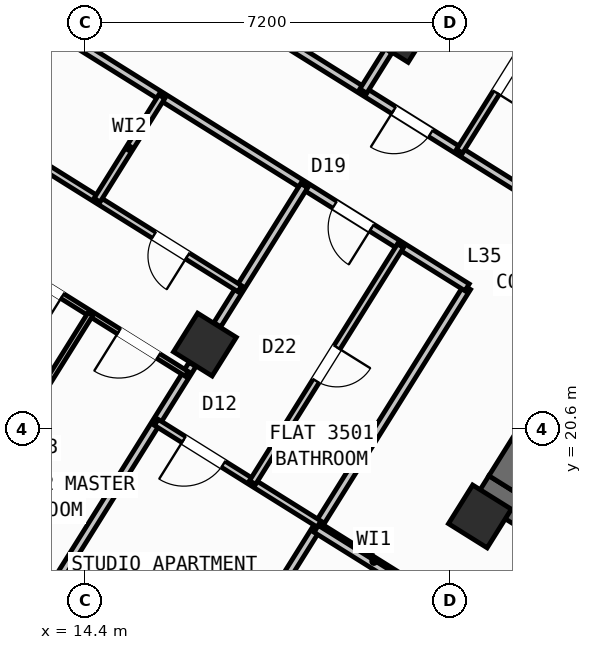
"""IFC4 building model, lengths in metres.
Left out: names, types, materials, properties, quantities, classifications, styles, units other than length and angle.
Written with IfcOpenShell. Run it as: python <this file> out.ifc"""

import sys

from ifc_helpers import new_model, si_unit, direction, frame, frame_2d, origin, origin_2d, place, context, subcontext, project, spatial, rectangle, hollow_rectangle, extrude, source, transform, mapped, element, fill, save


model = new_model("IFC4")
c1 = context("Model", 3, precision=1e-05, world=origin(), true_north=direction((0.0, 1.0)))
c2 = subcontext(c1, "Body", "Model", "MODEL_VIEW")
j1 = project(units=[si_unit("LENGTHUNIT", "METRE"), si_unit("PLANEANGLEUNIT", "RADIAN")], contexts=[c1])
p1 = place(None, origin())
s1 = spatial("IfcSite", under=j1, at=p1, CompositionType="ELEMENT")
p2 = place(p1, origin())
s2 = spatial("IfcBuilding", under=s1, at=p2, CompositionType="ELEMENT")
p3 = place(p2, frame((0.0, 0.0, 140.7)))
s3 = spatial("IfcBuildingStorey", under=s2, at=p3, CompositionType="ELEMENT", Elevation=140.7)
p4 = place(p3, frame((33.366, 12.477, 0.0), z_axis=(0.0, 0.0, 1.0), x_axis=(-0.848047359947, 0.529920442413, 0.0)))
e1 = element("IfcWall", 1, at=p4, inside=s3, PredefinedType="SHEAR", context=c2, shape_type="SweptSolid", body=[
    extrude(rectangle(XDim=13.14, YDim=0.55, at=frame_2d((6.57, 0.0))), origin(), (0.0, 0.0, 1.0), 3.35),
])
p5 = place(p3, frame((26.007, 24.976, 0.0), z_axis=(0.0, 0.0, 1.0), x_axis=(-0.529923795287, -0.848045264823, 0.0)))
e2 = element("IfcWall", 2, at=p5, inside=s3, PredefinedType="SHEAR", context=c2, shape_type="SweptSolid", body=[
    extrude(rectangle(XDim=6.425, YDim=0.55, at=frame_2d((3.212, 0.0))), origin(), (0.0, 0.0, 1.0), 3.35),
])
m1 = source(origin(), c2, "Body", "SweptSolid", [
    extrude(hollow_rectangle(XDim=0.9, YDim=0.9, WallThickness=0.036, at=origin_2d()), origin(), (0.0, 0.0, 1.0), 3.6),
])
for number, where, z_axis, x_axis in (
    (3, (22.191, 18.87, 0.0), (0.0, 0.0, 1.0), (-0.848, 0.53, 0.0)),
    (4, (20.632, 28.452, 0.0), (0.0, 0.0, 1.0), (-0.848, 0.53, 0.0)),
    (5, (16.764, 22.261, 0.0), (0.0, 0.0, 1.0), (-0.848, 0.53, 0.0)),
):
    element("IfcColumn", number, at=place(p3, frame(where, z_axis=z_axis, x_axis=x_axis)), inside=s3, PredefinedType="COLUMN", context=c2, shape_type="MappedRepresentation", body=[
        mapped(m1, transform((0.0, 0.0, 0.0), scale=1.0)),
    ])
p6 = place(p3, frame((29.268, 6.429, 0.0), z_axis=(0.0, 0.0, 1.0), x_axis=(-0.848049971435, 0.529916263149, 0.0)))
e6 = element("IfcWall", 6, at=p6, inside=s3, PredefinedType="STANDARD", context=c2, shape_type="SweptSolid", body=[
    extrude(rectangle(XDim=31.588, YDim=0.32, at=frame_2d((15.794, 0.0))), origin(), (0.0, 0.0, 1.0), 3.35),
])
p7 = place(p6, frame((16.362, 0.0, 0.0)))
e7 = element("IfcOpeningElement", 7, at=p7, cuts=e6, PredefinedType="OPENING", context=c2, shape_type="SweptSolid", body=[
    extrude(rectangle(XDim=1.2, YDim=2.15, at=frame_2d((0.6, 1.075))), frame((0.0, 0.17, 0.0), z_axis=(0.0, -1.0, 0.0), x_axis=(1.0, 0.0, 0.0)), (0.0, 0.0, 1.0), 0.34),
])
p8 = place(p6, frame((2.989, 0.0, 0.8)))
e8 = element("IfcOpeningElement", 8, at=p8, cuts=e6, PredefinedType="OPENING", context=c2, shape_type="SweptSolid", body=[
    extrude(rectangle(XDim=2.1, YDim=1.55, at=frame_2d((1.05, 0.775))), frame((0.0, 0.17, 0.0), z_axis=(0.0, -1.0, 0.0), x_axis=(1.0, 0.0, 0.0)), (0.0, 0.0, 1.0), 0.34),
])
p9 = place(p6, frame((8.359, 0.0, 0.8)))
e9 = element("IfcOpeningElement", 9, at=p9, cuts=e6, PredefinedType="OPENING", context=c2, shape_type="SweptSolid", body=[
    extrude(rectangle(XDim=2.1, YDim=1.55, at=frame_2d((1.05, 0.775))), frame((0.0, 0.17, 0.0), z_axis=(0.0, -1.0, 0.0), x_axis=(1.0, 0.0, 0.0)), (0.0, 0.0, 1.0), 0.34),
])
p10 = place(p6, frame((13.284, 0.0, 0.95)))
e10 = element("IfcOpeningElement", 10, at=p10, cuts=e6, PredefinedType="OPENING", context=c2, shape_type="SweptSolid", body=[
    extrude(rectangle(XDim=1.2, YDim=1.4, at=frame_2d((0.6, 0.7))), frame((0.0, 0.17, 0.0), z_axis=(0.0, -1.0, 0.0), x_axis=(1.0, 0.0, 0.0)), (0.0, 0.0, 1.0), 0.34),
])
p11 = place(p6, frame((29.188, 0.0, 0.95)))
e11 = element("IfcOpeningElement", 11, at=p11, cuts=e6, PredefinedType="OPENING", context=c2, shape_type="SweptSolid", body=[
    extrude(rectangle(XDim=1.2, YDim=1.4, at=frame_2d((0.6, 0.7))), frame((0.0, 0.17, 0.0), z_axis=(0.0, -1.0, 0.0), x_axis=(1.0, 0.0, 0.0)), (0.0, 0.0, 1.0), 0.34),
])
p12 = place(p6, frame((19.674, 0.0, 1.0)))
e12 = element("IfcOpeningElement", 12, at=p12, cuts=e6, PredefinedType="OPENING", context=c2, shape_type="SweptSolid", body=[
    extrude(rectangle(XDim=0.9, YDim=1.25, at=frame_2d((0.45, 0.625))), frame((0.0, 0.17, 0.0), z_axis=(0.0, -1.0, 0.0), x_axis=(1.0, 0.0, 0.0)), (0.0, 0.0, 1.0), 0.34),
])
p13 = place(p6, frame((21.896, 0.0, 1.0)))
e13 = element("IfcOpeningElement", 13, at=p13, cuts=e6, PredefinedType="OPENING", context=c2, shape_type="SweptSolid", body=[
    extrude(rectangle(XDim=0.9, YDim=1.25, at=frame_2d((0.45, 0.625))), frame((0.0, 0.17, 0.0), z_axis=(0.0, -1.0, 0.0), x_axis=(1.0, 0.0, 0.0)), (0.0, 0.0, 1.0), 0.34),
])
p14 = place(p6, frame((24.106, 0.0, 1.0)))
e14 = element("IfcOpeningElement", 14, at=p14, cuts=e6, PredefinedType="OPENING", context=c2, shape_type="SweptSolid", body=[
    extrude(rectangle(XDim=0.65, YDim=1.15, at=frame_2d((0.325, 0.575))), frame((0.0, 0.17, 0.0), z_axis=(0.0, -1.0, 0.0), x_axis=(1.0, 0.0, 0.0)), (0.0, 0.0, 1.0), 0.34),
])
p15 = place(p6, frame((26.366, 0.0, 1.0)))
e15 = element("IfcOpeningElement", 15, at=p15, cuts=e6, PredefinedType="OPENING", context=c2, shape_type="SweptSolid", body=[
    extrude(rectangle(XDim=0.9, YDim=1.25, at=frame_2d((0.45, 0.625))), frame((0.0, 0.17, 0.0), z_axis=(0.0, -1.0, 0.0), x_axis=(1.0, 0.0, 0.0)), (0.0, 0.0, 1.0), 0.34),
])
p16 = place(p3, frame((2.415, 23.452, 0.0), z_axis=(0.0, 0.0, 1.0), x_axis=(0.52991049553, 0.848053575387, 0.0)))
e16 = element("IfcWall", 16, at=p16, inside=s3, PredefinedType="STANDARD", context=c2, shape_type="SweptSolid", body=[
    extrude(rectangle(XDim=21.587, YDim=0.32, at=frame_2d((10.794, 0.0))), origin(), (0.0, 0.0, 1.0), 2.775),
])
p17 = place(p16, frame((2.356, 0.0, 0.8)))
e17 = element("IfcOpeningElement", 17, at=p17, cuts=e16, PredefinedType="OPENING", context=c2, shape_type="SweptSolid", body=[
    extrude(rectangle(XDim=2.1, YDim=1.55, at=frame_2d((1.05, 0.775))), frame((0.0, 0.17, 0.0), z_axis=(0.0, -1.0, 0.0), x_axis=(1.0, 0.0, 0.0)), (0.0, 0.0, 1.0), 0.34),
])
p18 = place(p16, frame((8.639, 0.0, 1.0)))
e18 = element("IfcOpeningElement", 18, at=p18, cuts=e16, PredefinedType="OPENING", context=c2, shape_type="SweptSolid", body=[
    extrude(rectangle(XDim=0.9, YDim=1.25, at=frame_2d((0.45, 0.625))), frame((0.0, 0.17, 0.0), z_axis=(0.0, -1.0, 0.0), x_axis=(1.0, 0.0, 0.0)), (0.0, 0.0, 1.0), 0.34),
])
p19 = place(p16, frame((17.744, 0.0, 0.85)))
e19 = element("IfcOpeningElement", 19, at=p19, cuts=e16, PredefinedType="OPENING", context=c2, shape_type="SweptSolid", body=[
    extrude(rectangle(XDim=1.5, YDim=1.5, at=frame_2d((0.75, 0.75))), frame((0.0, 0.17, 0.0), z_axis=(0.0, -1.0, 0.0), x_axis=(1.0, 0.0, 0.0)), (0.0, 0.0, 1.0), 0.34),
])
p20 = place(p3, frame((14.138, 41.825, 0.0), z_axis=(0.0, 0.0, 1.0), x_axis=(0.848046498049, -0.529921821731, 0.0)))
e20 = element("IfcWall", 20, at=p20, inside=s3, PredefinedType="STANDARD", context=c2, shape_type="SweptSolid", body=[
    extrude(rectangle(XDim=31.588, YDim=0.32, at=frame_2d((15.794, 0.0))), origin(), (0.0, 0.0, 1.0), 3.35),
])
p21 = place(p20, frame((2.949, 0.0, 0.0)))
e21 = element("IfcOpeningElement", 21, at=p21, cuts=e20, PredefinedType="OPENING", context=c2, shape_type="SweptSolid", body=[
    extrude(rectangle(XDim=1.05, YDim=2.15, at=frame_2d((0.525, 1.075))), frame((0.0, 0.17, 0.0), z_axis=(0.0, -1.0, 0.0), x_axis=(1.0, 0.0, 0.0)), (0.0, 0.0, 1.0), 0.34),
])
p22 = place(p20, frame((0.861, 0.0, 0.85)))
e22 = element("IfcOpeningElement", 22, at=p22, cuts=e20, PredefinedType="OPENING", context=c2, shape_type="SweptSolid", body=[
    extrude(rectangle(XDim=1.5, YDim=1.5, at=frame_2d((0.75, 0.75))), frame((0.0, 0.17, 0.0), z_axis=(0.0, -1.0, 0.0), x_axis=(1.0, 0.0, 0.0)), (0.0, 0.0, 1.0), 0.34),
])
p23 = place(p20, frame((8.494, 0.0, 0.85)))
e23 = element("IfcOpeningElement", 23, at=p23, cuts=e20, PredefinedType="OPENING", context=c2, shape_type="SweptSolid", body=[
    extrude(rectangle(XDim=1.8, YDim=1.5, at=frame_2d((0.9, 0.75))), frame((0.0, 0.17, 0.0), z_axis=(0.0, -1.0, 0.0), x_axis=(1.0, 0.0, 0.0)), (0.0, 0.0, 1.0), 0.34),
])
p24 = place(p20, frame((13.874, 0.0, 0.85)))
e24 = element("IfcOpeningElement", 24, at=p24, cuts=e20, PredefinedType="OPENING", context=c2, shape_type="SweptSolid", body=[
    extrude(rectangle(XDim=1.5, YDim=1.5, at=frame_2d((0.75, 0.75))), frame((0.0, 0.17, 0.0), z_axis=(0.0, -1.0, 0.0), x_axis=(1.0, 0.0, 0.0)), (0.0, 0.0, 1.0), 0.34),
])
p25 = place(p20, frame((17.104, 0.0, 1.0)))
e25 = element("IfcOpeningElement", 25, at=p25, cuts=e20, PredefinedType="OPENING", context=c2, shape_type="SweptSolid", body=[
    extrude(rectangle(XDim=0.9, YDim=1.25, at=frame_2d((0.45, 0.625))), frame((0.0, 0.17, 0.0), z_axis=(0.0, -1.0, 0.0), x_axis=(1.0, 0.0, 0.0)), (0.0, 0.0, 1.0), 0.34),
])
p26 = place(p20, frame((22.144, 0.0, 1.0)))
e26 = element("IfcOpeningElement", 26, at=p26, cuts=e20, PredefinedType="OPENING", context=c2, shape_type="SweptSolid", body=[
    extrude(rectangle(XDim=0.9, YDim=1.25, at=frame_2d((0.45, 0.625))), frame((0.0, 0.17, 0.0), z_axis=(0.0, -1.0, 0.0), x_axis=(1.0, 0.0, 0.0)), (0.0, 0.0, 1.0), 0.34),
])
p27 = place(p20, frame((27.744, 0.0, 1.0)))
e27 = element("IfcOpeningElement", 27, at=p27, cuts=e20, PredefinedType="OPENING", context=c2, shape_type="SweptSolid", body=[
    extrude(rectangle(XDim=0.9, YDim=1.25, at=frame_2d((0.45, 0.625))), frame((0.0, 0.17, 0.0), z_axis=(0.0, -1.0, 0.0), x_axis=(1.0, 0.0, 0.0)), (0.0, 0.0, 1.0), 0.34),
])
p28 = place(p3, frame((21.206, 17.292, 0.0), z_axis=(0.0, 0.0, 1.0), x_axis=(-0.848050851465, 0.529914854792, 0.0)))
e28 = element("IfcWall", 28, at=p28, inside=s3, PredefinedType="PARTITIONING", context=c2, shape_type="SweptSolid", body=[
    extrude(rectangle(XDim=2.61, YDim=0.16, at=frame_2d((1.305, 0.0))), origin(), (0.0, 0.0, 1.0), 3.34),
])
p29 = place(p3, frame((21.938, 23.391, 0.0), z_axis=(0.0, 0.0, 1.0), x_axis=(-0.529924725692, -0.848044683434, 0.0)))
e29 = element("IfcWall", 29, at=p29, inside=s3, PredefinedType="PARTITIONING", context=c2, shape_type="SweptSolid", body=[
    extrude(rectangle(XDim=10.35, YDim=0.16, at=frame_2d((5.175, 0.0))), origin(), (0.0, 0.0, 1.0), 3.34),
])
p30 = place(p3, frame((23.104, 25.256, 0.0), z_axis=(0.0, 0.0, 1.0), x_axis=(-0.848041752158, 0.529929416617, 0.0)))
e30 = element("IfcWall", 30, at=p30, inside=s3, PredefinedType="PARTITIONING", context=c2, shape_type="SweptSolid", body=[
    extrude(rectangle(XDim=16.73, YDim=0.16, at=frame_2d((8.365, 0.0))), origin(), (0.0, 0.0, 1.0), 3.34),
])
p31 = place(p30, frame((2.22, 0.0, 0.0)))
e31 = element("IfcOpeningElement", 31, at=p31, cuts=e30, PredefinedType="OPENING", context=c2, shape_type="SweptSolid", body=[
    extrude(rectangle(XDim=0.86, YDim=2.05, at=frame_2d((0.43, 1.025))), frame((0.0, 0.09, 0.0), z_axis=(0.0, -1.0, 0.0), x_axis=(1.0, 0.0, 0.0)), (0.0, 0.0, 1.0), 0.18),
])
p32 = place(p30, frame((12.084, 0.0, 0.0)))
e32 = element("IfcOpeningElement", 32, at=p32, cuts=e30, PredefinedType="OPENING", context=c2, shape_type="SweptSolid", body=[
    extrude(rectangle(XDim=1.0, YDim=2.1, at=frame_2d((0.5, 1.05))), frame((0.0, 0.09, 0.0), z_axis=(0.0, -1.0, 0.0), x_axis=(1.0, 0.0, 0.0)), (0.0, 0.0, 1.0), 0.18),
])
p33 = place(p3, frame((21.938, 23.391, 0.0), z_axis=(0.0, 0.0, 1.0), x_axis=(-0.848045850158, 0.529922858565, 0.0)))
e33 = element("IfcWall", 33, at=p33, inside=s3, PredefinedType="PARTITIONING", context=c2, shape_type="SweptSolid", body=[
    extrude(rectangle(XDim=16.73, YDim=0.16, at=frame_2d((8.365, 0.0))), origin(), (0.0, 0.0, 1.0), 3.34),
])
p34 = place(p33, frame((2.22, 0.0, 0.0)))
e34 = element("IfcOpeningElement", 34, at=p34, cuts=e33, PredefinedType="OPENING", context=c2, shape_type="SweptSolid", body=[
    extrude(rectangle(XDim=0.86, YDim=2.05, at=frame_2d((0.43, 1.025))), frame((0.0, 0.09, 0.0), z_axis=(0.0, -1.0, 0.0), x_axis=(1.0, 0.0, 0.0)), (0.0, 0.0, 1.0), 0.18),
])
p35 = place(p33, frame((14.22, 0.0, 0.0)))
e35 = element("IfcOpeningElement", 35, at=p35, cuts=e33, PredefinedType="OPENING", context=c2, shape_type="SweptSolid", body=[
    extrude(rectangle(XDim=1.0, YDim=2.1, at=frame_2d((0.5, 1.05))), frame((0.0, 0.09, 0.0), z_axis=(0.0, -1.0, 0.0), x_axis=(1.0, 0.0, 0.0)), (0.0, 0.0, 1.0), 0.18),
])
p36 = place(p3, frame((18.724, 25.399, 0.0), z_axis=(0.0, 0.0, 1.0), x_axis=(-0.529890499457, -0.848066069705, 0.0)))
e36 = element("IfcWall", 36, at=p36, inside=s3, PredefinedType="PARTITIONING", context=c2, shape_type="SweptSolid", body=[
    extrude(rectangle(XDim=3.238, YDim=0.16, at=frame_2d((1.619, 0.0))), origin(), (0.0, 0.0, 1.0), 2.775),
])
p37 = place(p3, frame((16.519, 21.87, 0.0), z_axis=(0.0, 0.0, 1.0), x_axis=(-0.529922447305, -0.848046107144, 0.0)))
e37 = element("IfcWall", 37, at=p37, inside=s3, PredefinedType="PARTITIONING", context=c2, shape_type="SweptSolid", body=[
    extrude(rectangle(XDim=5.451, YDim=0.16, at=frame_2d((2.726, 0.0))), origin(), (0.0, 0.0, 1.0), 2.775),
])
p38 = place(p3, frame((19.019, 18.718, 0.0), z_axis=(0.0, 0.0, 1.0), x_axis=(-0.848059820872, 0.529900500304, 0.0)))
e38 = element("IfcWall", 38, at=p38, inside=s3, PredefinedType="PLUMBINGWALL", context=c2, shape_type="SweptSolid", body=[
    extrude(rectangle(XDim=3.79, YDim=0.14, at=frame_2d((1.895, 0.0))), origin(), (0.0, 0.0, 1.0), 3.34),
])
p39 = place(p38, frame((2.23, 0.0, 0.0)))
e39 = element("IfcOpeningElement", 39, at=p39, cuts=e38, PredefinedType="OPENING", context=c2, shape_type="SweptSolid", body=[
    extrude(rectangle(XDim=0.92, YDim=2.08, at=frame_2d((0.46, 1.04))), frame((0.0, 0.08, 0.0), z_axis=(0.0, -1.0, 0.0), x_axis=(1.0, 0.0, 0.0)), (0.0, 0.0, 1.0), 0.16),
])
p40 = place(p3, frame((20.624, 24.212, 0.0), z_axis=(0.0, 0.0, 1.0), x_axis=(-0.529919283494, -0.848048084121, 0.0)))
e40 = element("IfcWall", 40, at=p40, inside=s3, PredefinedType="PLUMBINGWALL", context=c2, shape_type="SweptSolid", body=[
    extrude(rectangle(XDim=5.51, YDim=0.14, at=frame_2d((2.755, 0.0))), origin(), (0.0, 0.0, 1.0), 2.995),
])
p41 = place(p40, frame((2.365, 0.0, 0.0)))
e41 = element("IfcOpeningElement", 41, at=p41, cuts=e40, PredefinedType="OPENING", context=c2, shape_type="SweptSolid", body=[
    extrude(rectangle(XDim=0.78, YDim=2.05, at=frame_2d((0.39, 1.025))), frame((0.0, 0.08, 0.0), z_axis=(0.0, -1.0, 0.0), x_axis=(1.0, 0.0, 0.0)), (0.0, 0.0, 1.0), 0.16),
])
p42 = place(p3, frame((17.452, 23.364, 0.0), z_axis=(0.0, 0.0, 1.0), x_axis=(-0.848044326704, 0.52992529657, 0.0)))
e42 = element("IfcWall", 42, at=p42, inside=s3, PredefinedType="PLUMBINGWALL", context=c2, shape_type="SweptSolid", body=[
    extrude(rectangle(XDim=8.94, YDim=0.14, at=frame_2d((4.47, 0.0))), origin(), (0.0, 0.0, 1.0), 3.34),
])
p43 = place(p42, frame((5.087, 0.0, 0.0)))
e43 = element("IfcOpeningElement", 43, at=p43, cuts=e42, PredefinedType="OPENING", context=c2, shape_type="SweptSolid", body=[
    extrude(rectangle(XDim=0.78, YDim=2.05, at=frame_2d((0.39, 1.025))), frame((0.0, 0.08, 0.0), z_axis=(0.0, -1.0, 0.0), x_axis=(1.0, 0.0, 0.0)), (0.0, 0.0, 1.0), 0.16),
])
p44 = place(p42, frame((1.218, 0.0, 0.0)))
e44 = element("IfcOpeningElement", 44, at=p44, cuts=e42, PredefinedType="OPENING", context=c2, shape_type="SweptSolid", body=[
    extrude(rectangle(XDim=0.78, YDim=2.05, at=frame_2d((0.39, 1.025))), frame((0.0, 0.08, 0.0), z_axis=(0.0, -1.0, 0.0), x_axis=(1.0, 0.0, 0.0)), (0.0, 0.0, 1.0), 0.16),
])
p45 = place(p3, frame((15.913, 27.156, 0.0), z_axis=(0.0, 0.0, 1.0), x_axis=(-0.529935194983, -0.848038141311, 0.0)))
e45 = element("IfcWall", 45, at=p45, inside=s3, PredefinedType="PLUMBINGWALL", context=c2, shape_type="SweptSolid", body=[
    extrude(rectangle(XDim=2.41, YDim=0.14, at=frame_2d((1.205, 0.0))), origin(), (0.0, 0.0, 1.0), 3.34),
])
p46 = place(p3, frame((16.403, 21.685, 0.0), z_axis=(0.0, 0.0, 1.0), x_axis=(-0.848044326704, 0.52992529657, 0.0)))
e46 = element("IfcWall", 46, at=p46, inside=s3, PredefinedType="PARTITIONING", context=c2, shape_type="SweptSolid", body=[
    extrude(rectangle(XDim=8.94, YDim=0.11, at=frame_2d((4.47, 0.0))), origin(), (0.0, 0.0, 1.0), 3.34),
])
p47 = place(p46, frame((0.657, 0.0, 0.0)))
e47 = element("IfcOpeningElement", 47, at=p47, cuts=e46, PredefinedType="OPENING", context=c2, shape_type="SweptSolid", body=[
    extrude(rectangle(XDim=0.92, YDim=2.08, at=frame_2d((0.46, 1.04))), frame((0.0, 0.065, 0.0), z_axis=(0.0, -1.0, 0.0), x_axis=(1.0, 0.0, 0.0)), (0.0, 0.0, 1.0), 0.13),
])
p48 = place(p46, frame((2.893, 0.0, 0.0)))
e48 = element("IfcOpeningElement", 48, at=p48, cuts=e46, PredefinedType="OPENING", context=c2, shape_type="SweptSolid", body=[
    extrude(rectangle(XDim=0.92, YDim=2.08, at=frame_2d((0.46, 1.04))), frame((0.0, 0.065, 0.0), z_axis=(0.0, -1.0, 0.0), x_axis=(1.0, 0.0, 0.0)), (0.0, 0.0, 1.0), 0.13),
])
p49 = place(p46, frame((5.008, 0.0, 0.0)))
e49 = element("IfcOpeningElement", 49, at=p49, cuts=e46, PredefinedType="OPENING", context=c2, shape_type="SweptSolid", body=[
    extrude(rectangle(XDim=0.92, YDim=2.08, at=frame_2d((0.46, 1.04))), frame((0.0, 0.065, 0.0), z_axis=(0.0, -1.0, 0.0), x_axis=(1.0, 0.0, 0.0)), (0.0, 0.0, 1.0), 0.13),
])
p50 = place(p46, frame((7.363, 0.0, 0.0)))
e50 = element("IfcOpeningElement", 50, at=p50, cuts=e46, PredefinedType="OPENING", context=c2, shape_type="SweptSolid", body=[
    extrude(rectangle(XDim=0.92, YDim=2.08, at=frame_2d((0.46, 1.04))), frame((0.0, 0.065, 0.0), z_axis=(0.0, -1.0, 0.0), x_axis=(1.0, 0.0, 0.0)), (0.0, 0.0, 1.0), 0.13),
])
p51 = place(p3, frame((14.508, 22.869, 0.0), z_axis=(0.0, 0.0, 1.0), x_axis=(-0.529900466106, -0.848059842241, 0.0)))
e51 = element("IfcWall", 51, at=p51, inside=s3, PredefinedType="PARTITIONING", context=c2, shape_type="SweptSolid", body=[
    extrude(rectangle(XDim=6.24, YDim=0.11, at=frame_2d((3.12, 0.0))), origin(), (0.0, 0.0, 1.0), 2.995),
])
p52 = place(p3, frame((20.387, 28.06, 0.0), z_axis=(0.0, 0.0, 1.0), x_axis=(-0.529952145338, -0.848027548876, 0.0)))
e52 = element("IfcWall", 52, at=p52, inside=s3, PredefinedType="PARTITIONING", context=c2, shape_type="SweptSolid", body=[
    extrude(rectangle(XDim=0.938, YDim=0.16, at=frame_2d((0.469, 0.0))), origin(), (0.0, 0.0, 1.0), 2.775),
])
p53 = place(p3, frame((23.65, 29.054, 0.0), z_axis=(0.0, 0.0, 1.0), x_axis=(-0.529898896701, -0.848060822863, 0.0)))
e53 = element("IfcWall", 53, at=p53, inside=s3, PredefinedType="PLUMBINGWALL", context=c2, shape_type="SweptSolid", body=[
    extrude(rectangle(XDim=3.51, YDim=0.14, at=frame_2d((1.755, 0.0))), origin(), (0.0, 0.0, 1.0), 2.995),
])
p54 = place(p53, frame((1.365, 0.0, 0.0)))
e54 = element("IfcOpeningElement", 54, at=p54, cuts=e53, PredefinedType="OPENING", context=c2, shape_type="SweptSolid", body=[
    extrude(rectangle(XDim=0.78, YDim=2.05, at=frame_2d((0.39, 1.025))), frame((0.0, 0.08, 0.0), z_axis=(0.0, -1.0, 0.0), x_axis=(1.0, 0.0, 0.0)), (0.0, 0.0, 1.0), 0.16),
])
p55 = place(p3, frame((32.164, 10.374, 0.0), z_axis=(0.0, 0.0, 1.0), x_axis=(-0.848044107957, 0.529925646633, 0.0)))
e55 = element("IfcWall", 55, at=p55, inside=s3, PredefinedType="PARTITIONING", context=c2, shape_type="SweptSolid", body=[
    extrude(rectangle(XDim=15.57, YDim=0.16, at=frame_2d((7.785, 0.0))), origin(), (0.0, 0.0, 1.0), 3.34),
])
p56 = place(p55, frame((10.83, 0.0, 0.0)))
e56 = element("IfcOpeningElement", 56, at=p56, cuts=e55, PredefinedType="OPENING", context=c2, shape_type="SweptSolid", body=[
    extrude(rectangle(XDim=1.0, YDim=2.1, at=frame_2d((0.5, 1.05))), frame((0.0, 0.09, 0.0), z_axis=(0.0, -1.0, 0.0), x_axis=(1.0, 0.0, 0.0)), (0.0, 0.0, 1.0), 0.18),
])
m2 = source(origin(), c2, "Body", "SweptSolid", [
    extrude(rectangle(XDim=0.86, YDim=2.05, at=frame_2d((0.43, 1.025))), frame((0.0, 0.025, 0.0), z_axis=(0.0, -1.0, 0.0), x_axis=(1.0, 0.0, 0.0)), (0.0, 0.0, 1.0), 0.05),
])
p57 = place(p34, origin())
e57 = element("IfcDoor", 57, at=p57, inside=s3, OperationType="SINGLE_SWING_LEFT", PredefinedType="DOOR", context=c2, shape_type="MappedRepresentation", body=[
    mapped(m2, transform((0.0, 0.0, 0.0), scale=1.0)),
])
fill(e34, e57)
m3 = source(origin(), c2, "Body", "SweptSolid", [
    extrude(rectangle(XDim=0.92, YDim=2.08, at=frame_2d((0.46, 1.04))), frame((0.0, 0.025, 0.0), z_axis=(0.0, -1.0, 0.0), x_axis=(1.0, 0.0, 0.0)), (0.0, 0.0, 1.0), 0.05),
])
p58 = place(p39, origin())
e58 = element("IfcDoor", 58, at=p58, inside=s3, OperationType="SINGLE_SWING_RIGHT", PredefinedType="DOOR", context=c2, shape_type="MappedRepresentation", body=[
    mapped(m3, transform((0.0, 0.0, 0.0), scale=1.0)),
])
fill(e39, e58)
m4 = source(origin(), c2, "Body", "SweptSolid", [
    extrude(rectangle(XDim=0.78, YDim=2.05, at=frame_2d((0.39, 1.025))), frame((0.0, 0.025, 0.0), z_axis=(0.0, -1.0, 0.0), x_axis=(1.0, 0.0, 0.0)), (0.0, 0.0, 1.0), 0.05),
])
p59 = place(p41, origin())
e59 = element("IfcDoor", 59, at=p59, inside=s3, OperationType="SINGLE_SWING_LEFT", PredefinedType="DOOR", context=c2, shape_type="MappedRepresentation", body=[
    mapped(m4, transform((0.0, 0.0, 0.0), scale=1.0)),
])
fill(e41, e59)
p60 = place(p44, origin())
e60 = element("IfcDoor", 60, at=p60, inside=s3, OperationType="SINGLE_SWING_LEFT", PredefinedType="DOOR", context=c2, shape_type="MappedRepresentation", body=[
    mapped(m4, transform((0.0, 0.0, 0.0), scale=1.0)),
])
fill(e44, e60)
p61 = place(p47, origin())
e61 = element("IfcDoor", 61, at=p61, inside=s3, OperationType="SINGLE_SWING_RIGHT", PredefinedType="DOOR", context=c2, shape_type="MappedRepresentation", body=[
    mapped(m3, transform((0.0, 0.0, 0.0), scale=1.0)),
])
fill(e47, e61)
p62 = place(p48, origin())
e62 = element("IfcDoor", 62, at=p62, inside=s3, OperationType="SINGLE_SWING_LEFT", PredefinedType="DOOR", context=c2, shape_type="MappedRepresentation", body=[
    mapped(m3, transform((0.0, 0.0, 0.0), scale=1.0)),
])
fill(e48, e62)
p63 = place(p31, origin())
e63 = element("IfcDoor", 63, at=p63, inside=s3, OperationType="SINGLE_SWING_RIGHT", PredefinedType="DOOR", context=c2, shape_type="MappedRepresentation", body=[
    mapped(m2, transform((0.0, 0.0, 0.0), scale=1.0)),
])
fill(e31, e63)
p64 = place(p54, origin())
e64 = element("IfcDoor", 64, at=p64, inside=s3, OperationType="SINGLE_SWING_RIGHT", PredefinedType="DOOR", context=c2, shape_type="MappedRepresentation", body=[
    mapped(m4, transform((0.0, 0.0, 0.0), scale=1.0)),
])
fill(e54, e64)
save(model, sys.argv[1])
